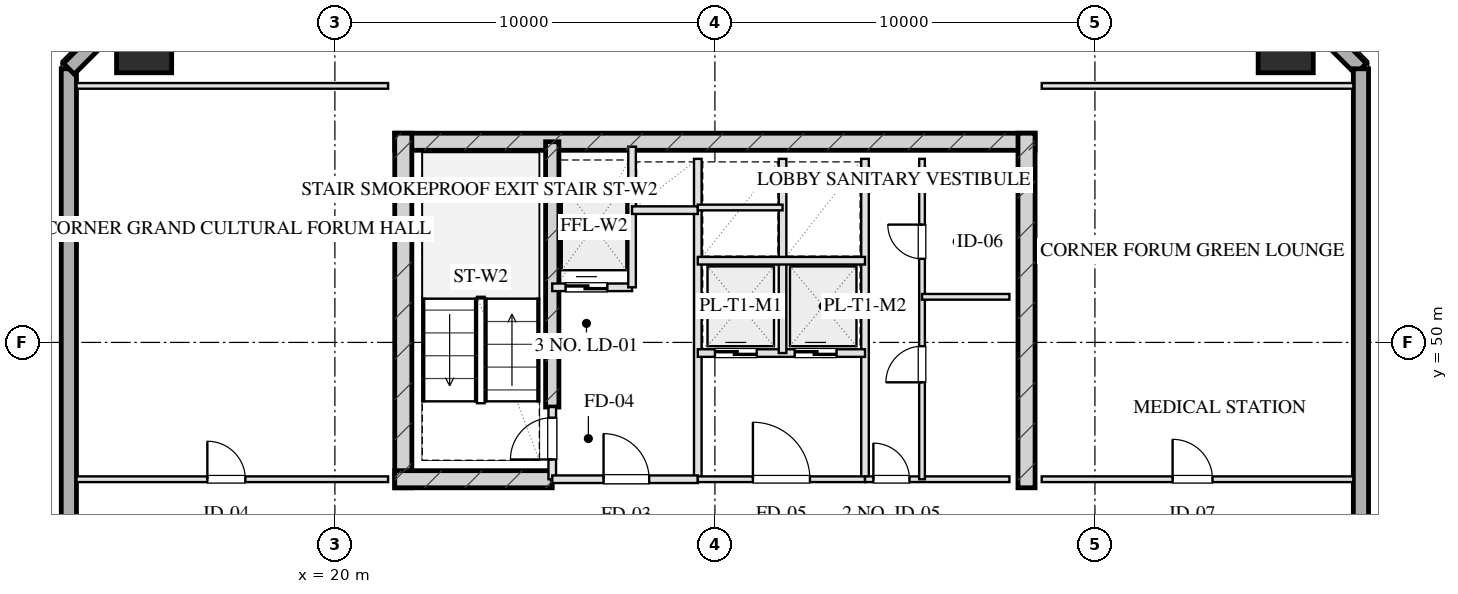
"""IFC4 building model, lengths in metres.
Left out: names, types, materials, properties, quantities, classifications, styles, units other than length and angle.
Written with IfcOpenShell. Run it as: python <this file> out.ifc"""

import sys

from ifc_helpers import new_model, si_unit, direction, frame, frame_2d, origin, origin_2d, place, context, subcontext, project, spatial, rectangle, hollow_rectangle, extrude, element, fill, save


model = new_model("IFC4")
c1 = context("Model", 3, precision=1e-05, world=origin(), true_north=direction((0.0, 1.0)))
c2 = subcontext(c1, "Body", "Model", "MODEL_VIEW")
j1 = project(units=[si_unit("LENGTHUNIT", "METRE"), si_unit("PLANEANGLEUNIT", "RADIAN")], contexts=[c1])
p1 = place(None, origin())
s1 = spatial("IfcSite", under=j1, at=p1, CompositionType="ELEMENT")
p2 = place(p1, origin())
s2 = spatial("IfcBuilding", under=s1, at=p2, CompositionType="ELEMENT")
p3 = place(p2, frame((0.0, 0.0, 198.95)))
s3 = spatial("IfcBuildingStorey", under=s2, at=p3, CompositionType="ELEMENT", Elevation=198.95)
p4 = place(p3, frame((21.575, 55.28, 0.0), z_axis=(0.0, 0.0, 1.0), x_axis=(1.0, 0.0, 0.0)))
e1 = element("IfcWall", 1, at=p4, inside=s3, PredefinedType="SHEAR", context=c2, shape_type="SweptSolid", body=[
    extrude(rectangle(XDim=16.85, YDim=0.45, at=frame_2d((8.425, 0.0))), origin(), (0.0, 0.0, 1.0), 3.45),
])
for number, where, z_axis, x_axis in (
    (2, (21.8, 46.175, 0.0), (0.0, 0.0, 1.0), (0.0, 1.0, 0.0)),
    (3, (38.2, 46.175, 0.0), (0.0, 0.0, 1.0), (0.0, 1.0, 0.0)),
):
    element("IfcWall", number, at=place(p3, frame(where, z_axis=z_axis, x_axis=x_axis)), inside=s3, PredefinedType="SHEAR", context=c2, shape_type="SweptSolid", body=[
        extrude(rectangle(XDim=9.33, YDim=0.45, at=frame_2d((4.665, 0.0))), origin(), (0.0, 0.0, 1.0), 3.45),
    ])
p5 = place(p3, frame((25.72, 48.3, 0.0), z_axis=(0.0, 0.0, 1.0), x_axis=(0.0, 1.0, 0.0)))
e4 = element("IfcWall", 4, at=p5, inside=s3, PredefinedType="SHEAR", context=c2, shape_type="SweptSolid", body=[
    extrude(rectangle(XDim=6.98, YDim=0.35, at=frame_2d((3.49, 0.0))), origin(), (0.0, 0.0, 1.0), 3.45),
])
p6 = place(p3, frame((21.575, 46.4, 0.0), z_axis=(0.0, 0.0, 1.0), x_axis=(1.0, 0.0, 0.0)))
e5 = element("IfcWall", 5, at=p6, inside=s3, PredefinedType="SHEAR", context=c2, shape_type="SweptSolid", body=[
    extrude(rectangle(XDim=4.145, YDim=0.45, at=frame_2d((2.073, 0.0))), origin(), (0.0, 0.0, 1.0), 3.45),
])
for number, where, z_axis, x_axis in (
    (6, (45.02, 57.82, 0.0), (0.0, 0.0, 1.0), (1.0, 0.0, 0.0)),
    (7, (14.98, 57.82, 0.0), (0.0, 0.0, 1.0), (1.0, 0.0, 0.0)),
):
    element("IfcColumn", number, at=place(p3, frame(where, z_axis=z_axis, x_axis=x_axis)), inside=s3, PredefinedType="COLUMN", context=c2, shape_type="SweptSolid", body=[
        extrude(hollow_rectangle(XDim=1.45, YDim=1.45, WallThickness=0.05, at=origin_2d()), origin(), (0.0, 0.0, 1.0), 3.451),
    ])
p7 = place(p3, frame((13.0, 10.8, 0.0), z_axis=(0.0, 0.0, 1.0), x_axis=(0.0, 1.0, 0.0)))
e8 = element("IfcWall", 8, at=p7, inside=s3, PredefinedType="SOLIDWALL", context=c2, shape_type="SweptSolid", body=[
    extrude(rectangle(XDim=46.4, YDim=0.4, at=frame_2d((23.2, 0.0))), origin(), (0.0, 0.0, 1.0), 2.61),
])
p8 = place(p7, frame((15.75, 0.0, 0.75)))
e9 = element("IfcOpeningElement", 9, at=p8, cuts=e8, PredefinedType="OPENING", context=c2, shape_type="SweptSolid", body=[
    extrude(rectangle(XDim=2.1, YDim=1.46, at=frame_2d((1.05, 0.73))), frame((0.0, 0.21, 0.0), z_axis=(0.0, -1.0, 0.0), x_axis=(1.0, 0.0, 0.0)), (0.0, 0.0, 1.0), 0.42),
])
p9 = place(p7, frame((19.55, 0.0, 0.75)))
e10 = element("IfcOpeningElement", 10, at=p9, cuts=e8, PredefinedType="OPENING", context=c2, shape_type="SweptSolid", body=[
    extrude(rectangle(XDim=2.1, YDim=1.46, at=frame_2d((1.05, 0.73))), frame((0.0, 0.21, 0.0), z_axis=(0.0, -1.0, 0.0), x_axis=(1.0, 0.0, 0.0)), (0.0, 0.0, 1.0), 0.42),
])
p10 = place(p7, frame((27.05, 0.0, 0.0)))
e11 = element("IfcOpeningElement", 11, at=p10, cuts=e8, PredefinedType="OPENING", context=c2, shape_type="SweptSolid", body=[
    extrude(rectangle(XDim=1.1, YDim=2.15, at=frame_2d((0.55, 1.075))), frame((0.0, 0.21, 0.0), z_axis=(0.0, -1.0, 0.0), x_axis=(1.0, 0.0, 0.0)), (0.0, 0.0, 1.0), 0.42),
])
for number, where, z_axis, x_axis in (
    (12, (13.0, 57.2, 0.0), (0.0, 0.0, 1.0), (0.707, 0.707, 0.0)),
    (13, (44.4, 59.8, 0.0), (0.0, 0.0, 1.0), (0.707, -0.707, 0.0)),
):
    element("IfcWall", number, at=place(p3, frame(where, z_axis=z_axis, x_axis=x_axis)), inside=s3, PredefinedType="SOLIDWALL", context=c2, shape_type="SweptSolid", body=[
        extrude(rectangle(XDim=3.677, YDim=0.4, at=frame_2d((1.838, 0.0))), origin(), (0.0, 0.0, 1.0), 2.61),
    ])
p11 = place(p3, frame((47.0, 57.2, 0.0), z_axis=(0.0, 0.0, 1.0), x_axis=(0.0, -1.0, 0.0)))
e14 = element("IfcWall", 14, at=p11, inside=s3, PredefinedType="SOLIDWALL", context=c2, shape_type="SweptSolid", body=[
    extrude(rectangle(XDim=46.4, YDim=0.4, at=frame_2d((23.2, 0.0))), origin(), (0.0, 0.0, 1.0), 2.61),
])
p12 = place(p11, frame((28.55, 0.0, 0.75)))
e15 = element("IfcOpeningElement", 15, at=p12, cuts=e14, PredefinedType="OPENING", context=c2, shape_type="SweptSolid", body=[
    extrude(rectangle(XDim=2.1, YDim=1.46, at=frame_2d((1.05, 0.73))), frame((0.0, 0.21, 0.0), z_axis=(0.0, -1.0, 0.0), x_axis=(1.0, 0.0, 0.0)), (0.0, 0.0, 1.0), 0.42),
])
p13 = place(p11, frame((24.75, 0.0, 0.75)))
e16 = element("IfcOpeningElement", 16, at=p13, cuts=e14, PredefinedType="OPENING", context=c2, shape_type="SweptSolid", body=[
    extrude(rectangle(XDim=2.1, YDim=1.46, at=frame_2d((1.05, 0.73))), frame((0.0, 0.21, 0.0), z_axis=(0.0, -1.0, 0.0), x_axis=(1.0, 0.0, 0.0)), (0.0, 0.0, 1.0), 0.42),
])
p14 = place(p11, frame((16.667, 0.0, 0.0)))
e17 = element("IfcOpeningElement", 17, at=p14, cuts=e14, PredefinedType="OPENING", context=c2, shape_type="SweptSolid", body=[
    extrude(rectangle(XDim=1.1, YDim=2.15, at=frame_2d((0.55, 1.075))), frame((0.0, 0.21, 0.0), z_axis=(0.0, -1.0, 0.0), x_axis=(1.0, 0.0, 0.0)), (0.0, 0.0, 1.0), 0.42),
])
p15 = place(p3, frame((25.72, 46.4, 0.0), z_axis=(0.0, 0.0, 1.0), x_axis=(0.0, 1.0, 0.0)))
e18 = element("IfcWall", 18, at=p15, inside=s3, PredefinedType="PARTITIONING", context=c2, shape_type="SweptSolid", body=[
    extrude(rectangle(XDim=1.9, YDim=0.2, at=frame_2d((0.95, 0.0))), origin(), (0.0, 0.0, 1.0), 3.175),
])
p16 = place(p15, frame((0.52, 0.0, 0.0)))
e19 = element("IfcOpeningElement", 19, at=p16, cuts=e18, PredefinedType="OPENING", context=c2, shape_type="SweptSolid", body=[
    extrude(rectangle(XDim=1.1, YDim=2.05, at=frame_2d((0.55, 1.025))), frame((0.0, 0.11, 0.0), z_axis=(0.0, -1.0, 0.0), x_axis=(1.0, 0.0, 0.0)), (0.0, 0.0, 1.0), 0.22),
])
p17 = place(p3, frame((29.55, 46.4, 0.0), z_axis=(0.0, 0.0, 1.0), x_axis=(0.0, 1.0, 0.0)))
e20 = element("IfcWall", 20, at=p17, inside=s3, PredefinedType="PARTITIONING", context=c2, shape_type="SweptSolid", body=[
    extrude(rectangle(XDim=8.43, YDim=0.2, at=frame_2d((4.215, 0.0))), origin(), (0.0, 0.0, 1.0), 3.175),
])
p18 = place(p3, frame((25.72, 46.4, 0.0), z_axis=(0.0, 0.0, 1.0), x_axis=(1.0, 0.0, 0.0)))
e21 = element("IfcWall", 21, at=p18, inside=s3, PredefinedType="PARTITIONING", context=c2, shape_type="SweptSolid", body=[
    extrude(rectangle(XDim=3.83, YDim=0.2, at=frame_2d((1.915, 0.0))), origin(), (0.0, 0.0, 1.0), 3.175),
])
p19 = place(p18, frame((1.35, 0.0, 0.0)))
e22 = element("IfcOpeningElement", 22, at=p19, cuts=e21, PredefinedType="OPENING", context=c2, shape_type="SweptSolid", body=[
    extrude(rectangle(XDim=1.2, YDim=2.05, at=frame_2d((0.6, 1.025))), frame((0.0, 0.11, 0.0), z_axis=(0.0, -1.0, 0.0), x_axis=(1.0, 0.0, 0.0)), (0.0, 0.0, 1.0), 0.22),
])
p20 = place(p3, frame((25.72, 51.45, 0.0), z_axis=(0.0, 0.0, 1.0), x_axis=(1.0, 0.0, 0.0)))
e23 = element("IfcWall", 23, at=p20, inside=s3, PredefinedType="PARTITIONING", context=c2, shape_type="SweptSolid", body=[
    extrude(rectangle(XDim=2.1, YDim=0.2, at=frame_2d((1.05, 0.0))), origin(), (0.0, 0.0, 1.0), 3.175),
])
p21 = place(p20, frame((0.35, 0.0, 0.0)))
e24 = element("IfcOpeningElement", 24, at=p21, cuts=e23, PredefinedType="OPENING", context=c2, shape_type="SweptSolid", body=[
    extrude(rectangle(XDim=1.1, YDim=2.05, at=frame_2d((0.55, 1.025))), frame((0.0, 0.11, 0.0), z_axis=(0.0, -1.0, 0.0), x_axis=(1.0, 0.0, 0.0)), (0.0, 0.0, 1.0), 0.22),
])
p22 = place(p3, frame((27.82, 51.45, 0.0), z_axis=(0.0, 0.0, 1.0), x_axis=(0.0, 1.0, 0.0)))
e25 = element("IfcWall", 25, at=p22, inside=s3, PredefinedType="PARTITIONING", context=c2, shape_type="SweptSolid", body=[
    extrude(rectangle(XDim=3.7, YDim=0.2, at=frame_2d((1.85, 0.0))), origin(), (0.0, 0.0, 1.0), 3.175),
])
p23 = place(p3, frame((27.82, 53.48, 0.0), z_axis=(0.0, 0.0, 1.0), x_axis=(1.0, 0.0, 0.0)))
e26 = element("IfcWall", 26, at=p23, inside=s3, PredefinedType="PARTITIONING", context=c2, shape_type="SweptSolid", body=[
    extrude(rectangle(XDim=1.73, YDim=0.2, at=frame_2d((0.865, 0.0))), origin(), (0.0, 0.0, 1.0), 3.175),
])
p24 = place(p3, frame((33.95, 46.4, 0.0), z_axis=(0.0, 0.0, 1.0), x_axis=(0.0, 1.0, 0.0)))
e27 = element("IfcWall", 27, at=p24, inside=s3, PredefinedType="PARTITIONING", context=c2, shape_type="SweptSolid", body=[
    extrude(rectangle(XDim=8.43, YDim=0.2, at=frame_2d((4.215, 0.0))), origin(), (0.0, 0.0, 1.0), 3.175),
])
p25 = place(p3, frame((29.55, 46.4, 0.0), z_axis=(0.0, 0.0, 1.0), x_axis=(1.0, 0.0, 0.0)))
e28 = element("IfcWall", 28, at=p25, inside=s3, PredefinedType="PARTITIONING", context=c2, shape_type="SweptSolid", body=[
    extrude(rectangle(XDim=4.4, YDim=0.15, at=frame_2d((2.2, 0.0))), origin(), (0.0, 0.0, 1.0), 3.175),
])
p26 = place(p25, frame((1.45, 0.0, 0.0)))
e29 = element("IfcOpeningElement", 29, at=p26, cuts=e28, PredefinedType="OPENING", context=c2, shape_type="SweptSolid", body=[
    extrude(rectangle(XDim=1.5, YDim=2.05, at=frame_2d((0.75, 1.025))), frame((0.0, 0.085, 0.0), z_axis=(0.0, -1.0, 0.0), x_axis=(1.0, 0.0, 0.0)), (0.0, 0.0, 1.0), 0.17),
])
p27 = place(p3, frame((29.55, 49.72, 0.0), z_axis=(0.0, 0.0, 1.0), x_axis=(1.0, 0.0, 0.0)))
e30 = element("IfcWall", 30, at=p27, inside=s3, PredefinedType="PARTITIONING", context=c2, shape_type="SweptSolid", body=[
    extrude(rectangle(XDim=4.4, YDim=0.2, at=frame_2d((2.2, 0.0))), origin(), (0.0, 0.0, 1.0), 3.175),
])
p28 = place(p27, frame((0.45, 0.0, 0.0)))
e31 = element("IfcOpeningElement", 31, at=p28, cuts=e30, PredefinedType="OPENING", context=c2, shape_type="SweptSolid", body=[
    extrude(rectangle(XDim=1.1, YDim=2.05, at=frame_2d((0.55, 1.025))), frame((0.0, 0.11, 0.0), z_axis=(0.0, -1.0, 0.0), x_axis=(1.0, 0.0, 0.0)), (0.0, 0.0, 1.0), 0.22),
])
p29 = place(p27, frame((2.55, 0.0, 0.0)))
e32 = element("IfcOpeningElement", 32, at=p29, cuts=e30, PredefinedType="OPENING", context=c2, shape_type="SweptSolid", body=[
    extrude(rectangle(XDim=1.1, YDim=2.05, at=frame_2d((0.55, 1.025))), frame((0.0, 0.11, 0.0), z_axis=(0.0, -1.0, 0.0), x_axis=(1.0, 0.0, 0.0)), (0.0, 0.0, 1.0), 0.22),
])
p30 = place(p3, frame((31.78, 49.72, 0.0), z_axis=(0.0, 0.0, 1.0), x_axis=(0.0, 1.0, 0.0)))
e33 = element("IfcWall", 33, at=p30, inside=s3, PredefinedType="PARTITIONING", context=c2, shape_type="SweptSolid", body=[
    extrude(rectangle(XDim=5.11, YDim=0.2, at=frame_2d((2.555, 0.0))), origin(), (0.0, 0.0, 1.0), 3.175),
])
p31 = place(p3, frame((29.55, 52.15, 0.0), z_axis=(0.0, 0.0, 1.0), x_axis=(1.0, 0.0, 0.0)))
e34 = element("IfcWall", 34, at=p31, inside=s3, PredefinedType="PARTITIONING", context=c2, shape_type="SweptSolid", body=[
    extrude(rectangle(XDim=4.4, YDim=0.2, at=frame_2d((2.2, 0.0))), origin(), (0.0, 0.0, 1.0), 3.175),
])
p32 = place(p3, frame((29.55, 53.55, 0.0), z_axis=(0.0, 0.0, 1.0), x_axis=(1.0, 0.0, 0.0)))
e35 = element("IfcWall", 35, at=p32, inside=s3, PredefinedType="PARTITIONING", context=c2, shape_type="SweptSolid", body=[
    extrude(rectangle(XDim=2.23, YDim=0.15, at=frame_2d((1.115, 0.0))), origin(), (0.0, 0.0, 1.0), 3.175),
])
p33 = place(p3, frame((33.95, 46.4, 0.0), z_axis=(0.0, 0.0, 1.0), x_axis=(1.0, 0.0, 0.0)))
e36 = element("IfcWall", 36, at=p33, inside=s3, PredefinedType="PARTITIONING", context=c2, shape_type="SweptSolid", body=[
    extrude(rectangle(XDim=3.8, YDim=0.15, at=frame_2d((1.9, 0.0))), origin(), (0.0, 0.0, 1.0), 3.175),
])
p34 = place(p33, frame((0.22, 0.0, 0.0)))
e37 = element("IfcOpeningElement", 37, at=p34, cuts=e36, PredefinedType="OPENING", context=c2, shape_type="SweptSolid", body=[
    extrude(rectangle(XDim=0.95, YDim=2.05, at=frame_2d((0.475, 1.025))), frame((0.0, 0.085, 0.0), z_axis=(0.0, -1.0, 0.0), x_axis=(1.0, 0.0, 0.0)), (0.0, 0.0, 1.0), 0.17),
])
p35 = place(p3, frame((35.45, 46.4, 0.0), z_axis=(0.0, 0.0, 1.0), x_axis=(0.0, 1.0, 0.0)))
e38 = element("IfcWall", 38, at=p35, inside=s3, PredefinedType="PARTITIONING", context=c2, shape_type="SweptSolid", body=[
    extrude(rectangle(XDim=8.43, YDim=0.15, at=frame_2d((4.215, 0.0))), origin(), (0.0, 0.0, 1.0), 2.815),
])
p36 = place(p35, frame((2.55, 0.0, 0.0)))
e39 = element("IfcOpeningElement", 39, at=p36, cuts=e38, PredefinedType="OPENING", context=c2, shape_type="SweptSolid", body=[
    extrude(rectangle(XDim=0.95, YDim=2.05, at=frame_2d((0.475, 1.025))), frame((0.0, 0.085, 0.0), z_axis=(0.0, -1.0, 0.0), x_axis=(1.0, 0.0, 0.0)), (0.0, 0.0, 1.0), 0.17),
])
p37 = place(p35, frame((5.8, 0.0, 0.0)))
e40 = element("IfcOpeningElement", 40, at=p37, cuts=e38, PredefinedType="OPENING", context=c2, shape_type="SweptSolid", body=[
    extrude(rectangle(XDim=0.9, YDim=2.05, at=frame_2d((0.45, 1.025))), frame((0.0, 0.085, 0.0), z_axis=(0.0, -1.0, 0.0), x_axis=(1.0, 0.0, 0.0)), (0.0, 0.0, 1.0), 0.17),
])
p38 = place(p3, frame((35.45, 51.2, 0.0), z_axis=(0.0, 0.0, 1.0), x_axis=(1.0, 0.0, 0.0)))
e41 = element("IfcWall", 41, at=p38, inside=s3, PredefinedType="PARTITIONING", context=c2, shape_type="SweptSolid", body=[
    extrude(rectangle(XDim=2.3, YDim=0.15, at=frame_2d((1.15, 0.0))), origin(), (0.0, 0.0, 1.0), 3.175),
])
p39 = place(p3, frame((13.2, 56.75, 0.0), z_axis=(0.0, 0.0, 1.0), x_axis=(1.0, 0.0, 0.0)))
e42 = element("IfcWall", 42, at=p39, inside=s3, PredefinedType="PARTITIONING", context=c2, shape_type="SweptSolid", body=[
    extrude(rectangle(XDim=8.2, YDim=0.15, at=frame_2d((4.1, 0.0))), origin(), (0.0, 0.0, 1.0), 3.175),
])
p40 = place(p3, frame((13.2, 46.4, 0.0), z_axis=(0.0, 0.0, 1.0), x_axis=(1.0, 0.0, 0.0)))
e43 = element("IfcWall", 43, at=p40, inside=s3, PredefinedType="PARTITIONING", context=c2, shape_type="SweptSolid", body=[
    extrude(rectangle(XDim=8.2, YDim=0.15, at=frame_2d((4.1, 0.0))), origin(), (0.0, 0.0, 1.0), 3.175),
])
p41 = place(p40, frame((3.444, 0.0, 0.0)))
e44 = element("IfcOpeningElement", 44, at=p41, cuts=e43, PredefinedType="OPENING", context=c2, shape_type="SweptSolid", body=[
    extrude(rectangle(XDim=1.0, YDim=2.05, at=frame_2d((0.5, 1.025))), frame((0.0, 0.085, 0.0), z_axis=(0.0, -1.0, 0.0), x_axis=(1.0, 0.0, 0.0)), (0.0, 0.0, 1.0), 0.17),
])
p42 = place(p3, frame((38.6, 56.75, 0.0), z_axis=(0.0, 0.0, 1.0), x_axis=(1.0, 0.0, 0.0)))
e45 = element("IfcWall", 45, at=p42, inside=s3, PredefinedType="PARTITIONING", context=c2, shape_type="SweptSolid", body=[
    extrude(rectangle(XDim=8.2, YDim=0.15, at=frame_2d((4.1, 0.0))), origin(), (0.0, 0.0, 1.0), 3.175),
])
p43 = place(p3, frame((38.6, 46.4, 0.0), z_axis=(0.0, 0.0, 1.0), x_axis=(1.0, 0.0, 0.0)))
e46 = element("IfcWall", 46, at=p43, inside=s3, PredefinedType="PARTITIONING", context=c2, shape_type="SweptSolid", body=[
    extrude(rectangle(XDim=8.2, YDim=0.15, at=frame_2d((4.1, 0.0))), origin(), (0.0, 0.0, 1.0), 3.175),
])
p44 = place(p43, frame((3.444, 0.0, 0.0)))
e47 = element("IfcOpeningElement", 47, at=p44, cuts=e46, PredefinedType="OPENING", context=c2, shape_type="SweptSolid", body=[
    extrude(rectangle(XDim=1.05, YDim=2.05, at=frame_2d((0.525, 1.025))), frame((0.0, 0.085, 0.0), z_axis=(0.0, -1.0, 0.0), x_axis=(1.0, 0.0, 0.0)), (0.0, 0.0, 1.0), 0.17),
])
p45 = place(p16, origin())
e48 = element("IfcDoor", 48, at=p45, inside=s3, OperationType="SINGLE_SWING_LEFT", PredefinedType="DOOR", context=c2, shape_type="SweptSolid", body=[
    extrude(rectangle(XDim=1.1, YDim=2.05, at=frame_2d((0.55, 1.025))), frame((0.0, 0.025, 0.0), z_axis=(0.0, -1.0, 0.0), x_axis=(1.0, 0.0, 0.0)), (0.0, 0.0, 1.0), 0.05),
])
fill(e19, e48)
p46 = place(p19, origin())
e49 = element("IfcDoor", 49, at=p46, inside=s3, OperationType="SINGLE_SWING_LEFT", PredefinedType="DOOR", context=c2, shape_type="SweptSolid", body=[
    extrude(rectangle(XDim=1.2, YDim=2.05, at=frame_2d((0.6, 1.025))), frame((0.0, 0.025, 0.0), z_axis=(0.0, -1.0, 0.0), x_axis=(1.0, 0.0, 0.0)), (0.0, 0.0, 1.0), 0.05),
])
fill(e22, e49)
p47 = place(p21, origin())
e50 = element("IfcDoor", 50, at=p47, inside=s3, OperationType="DOUBLE_DOOR_SLIDING", PredefinedType="DOOR", context=c2, shape_type="SweptSolid", body=[
    extrude(rectangle(XDim=1.1, YDim=2.05, at=frame_2d((0.55, 1.025))), frame((0.0, 0.025, 0.0), z_axis=(0.0, -1.0, 0.0), x_axis=(1.0, 0.0, 0.0)), (0.0, 0.0, 1.0), 0.05),
])
fill(e24, e50)
p48 = place(p26, origin())
e51 = element("IfcDoor", 51, at=p48, inside=s3, OperationType="SINGLE_SWING_LEFT", PredefinedType="DOOR", context=c2, shape_type="SweptSolid", body=[
    extrude(rectangle(XDim=1.5, YDim=2.05, at=frame_2d((0.75, 1.025))), frame((0.0, 0.025, 0.0), z_axis=(0.0, -1.0, 0.0), x_axis=(1.0, 0.0, 0.0)), (0.0, 0.0, 1.0), 0.05),
])
fill(e29, e51)
p49 = place(p28, origin())
e52 = element("IfcDoor", 52, at=p49, inside=s3, OperationType="DOUBLE_DOOR_SLIDING", PredefinedType="DOOR", context=c2, shape_type="SweptSolid", body=[
    extrude(rectangle(XDim=1.1, YDim=2.05, at=frame_2d((0.55, 1.025))), frame((0.0, 0.025, 0.0), z_axis=(0.0, -1.0, 0.0), x_axis=(1.0, 0.0, 0.0)), (0.0, 0.0, 1.0), 0.05),
])
fill(e31, e52)
p50 = place(p29, origin())
e53 = element("IfcDoor", 53, at=p50, inside=s3, OperationType="DOUBLE_DOOR_SLIDING", PredefinedType="DOOR", context=c2, shape_type="SweptSolid", body=[
    extrude(rectangle(XDim=1.1, YDim=2.05, at=frame_2d((0.55, 1.025))), frame((0.0, 0.025, 0.0), z_axis=(0.0, -1.0, 0.0), x_axis=(1.0, 0.0, 0.0)), (0.0, 0.0, 1.0), 0.05),
])
fill(e32, e53)
p51 = place(p34, origin())
e54 = element("IfcDoor", 54, at=p51, inside=s3, OperationType="SINGLE_SWING_LEFT", PredefinedType="DOOR", context=c2, shape_type="SweptSolid", body=[
    extrude(rectangle(XDim=0.95, YDim=2.05, at=frame_2d((0.475, 1.025))), frame((0.0, 0.025, 0.0), z_axis=(0.0, -1.0, 0.0), x_axis=(1.0, 0.0, 0.0)), (0.0, 0.0, 1.0), 0.05),
])
fill(e37, e54)
p52 = place(p36, origin())
e55 = element("IfcDoor", 55, at=p52, inside=s3, OperationType="SINGLE_SWING_LEFT", PredefinedType="DOOR", context=c2, shape_type="SweptSolid", body=[
    extrude(rectangle(XDim=0.95, YDim=2.05, at=frame_2d((0.475, 1.025))), frame((0.0, 0.025, 0.0), z_axis=(0.0, -1.0, 0.0), x_axis=(1.0, 0.0, 0.0)), (0.0, 0.0, 1.0), 0.05),
])
fill(e39, e55)
p53 = place(p37, origin())
e56 = element("IfcDoor", 56, at=p53, inside=s3, OperationType="SINGLE_SWING_RIGHT", PredefinedType="DOOR", context=c2, shape_type="SweptSolid", body=[
    extrude(rectangle(XDim=0.9, YDim=2.05, at=frame_2d((0.45, 1.025))), frame((0.0, 0.025, 0.0), z_axis=(0.0, -1.0, 0.0), x_axis=(1.0, 0.0, 0.0)), (0.0, 0.0, 1.0), 0.05),
])
fill(e40, e56)
p54 = place(p41, origin())
e57 = element("IfcDoor", 57, at=p54, inside=s3, OperationType="SINGLE_SWING_LEFT", PredefinedType="DOOR", context=c2, shape_type="SweptSolid", body=[
    extrude(rectangle(XDim=1.0, YDim=2.05, at=frame_2d((0.5, 1.025))), frame((0.0, 0.025, 0.0), z_axis=(0.0, -1.0, 0.0), x_axis=(1.0, 0.0, 0.0)), (0.0, 0.0, 1.0), 0.05),
])
fill(e44, e57)
p55 = place(p44, origin())
e58 = element("IfcDoor", 58, at=p55, inside=s3, OperationType="SINGLE_SWING_LEFT", PredefinedType="DOOR", context=c2, shape_type="SweptSolid", body=[
    extrude(rectangle(XDim=1.05, YDim=2.05, at=frame_2d((0.525, 1.025))), frame((0.0, 0.025, 0.0), z_axis=(0.0, -1.0, 0.0), x_axis=(1.0, 0.0, 0.0)), (0.0, 0.0, 1.0), 0.05),
])
fill(e47, e58)
save(model, sys.argv[1])
